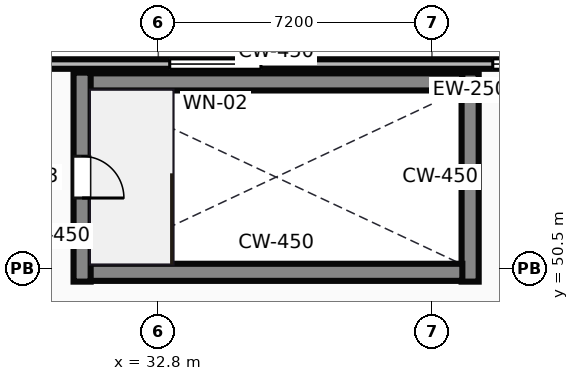
"""IFC4 building model, lengths in metres.
Left out: names, types, materials, properties, quantities, classifications, styles, units other than length and angle.
Written with IfcOpenShell. Run it as: python <this file> out.ifc"""

import sys

from ifc_helpers import new_model, si_unit, direction, frame, frame_2d, origin, place, context, subcontext, project, spatial, rectangle, extrude, source, transform, mapped, element, fill, save


model = new_model("IFC4")
c1 = context("Model", 3, precision=1e-05, world=origin(), true_north=direction((0.0, 1.0)))
c2 = subcontext(c1, "Body", "Model", "MODEL_VIEW")
j1 = project(units=[si_unit("LENGTHUNIT", "METRE"), si_unit("PLANEANGLEUNIT", "RADIAN")], contexts=[c1])
p1 = place(None, origin())
s1 = spatial("IfcSite", under=j1, at=p1, CompositionType="ELEMENT")
p2 = place(p1, origin())
s2 = spatial("IfcBuilding", under=s1, at=p2, CompositionType="ELEMENT")
p3 = place(p2, frame((0.0, 0.0, 21.0)))
s3 = spatial("IfcBuildingStorey", under=s2, at=p3, CompositionType="ELEMENT", Elevation=21.0)
m1 = source(origin(), c2, "Body", "SweptSolid", [
    extrude(rectangle(XDim=82.0, YDim=0.25, at=frame_2d((41.0, 0.0))), origin(), (0.0, 0.0, 1.0), 4.7),
])
p4 = place(p3, frame((82.0, 55.875, 0.0), z_axis=(0.0, 0.0, 1.0), x_axis=(-1.0, 0.0, 0.0)))
e1 = element("IfcWall", 1, at=p4, inside=s3, PredefinedType="STANDARD", context=c2, shape_type="MappedRepresentation", body=[
    mapped(m1, transform((0.0, 0.0, 0.0))),
])
p5 = place(p4, frame((8.0, 0.0, 0.9)))
e2 = element("IfcOpeningElement", 2, at=p5, cuts=e1, PredefinedType="OPENING", context=c2, shape_type="SweptSolid", body=[
    extrude(rectangle(XDim=2.4, YDim=2.2, at=frame_2d((1.2, 1.1))), frame((0.0, 0.135, 0.0), z_axis=(0.0, -1.0, 0.0), x_axis=(1.0, 0.0, 0.0)), (0.0, 0.0, 1.0), 0.27),
])
p6 = place(p4, frame((18.0, 0.0, 0.9)))
e3 = element("IfcOpeningElement", 3, at=p6, cuts=e1, PredefinedType="OPENING", context=c2, shape_type="SweptSolid", body=[
    extrude(rectangle(XDim=2.4, YDim=2.2, at=frame_2d((1.2, 1.1))), frame((0.0, 0.135, 0.0), z_axis=(0.0, -1.0, 0.0), x_axis=(1.0, 0.0, 0.0)), (0.0, 0.0, 1.0), 0.27),
])
p7 = place(p4, frame((28.0, 0.0, 0.9)))
e4 = element("IfcOpeningElement", 4, at=p7, cuts=e1, PredefinedType="OPENING", context=c2, shape_type="SweptSolid", body=[
    extrude(rectangle(XDim=2.4, YDim=2.2, at=frame_2d((1.2, 1.1))), frame((0.0, 0.135, 0.0), z_axis=(0.0, -1.0, 0.0), x_axis=(1.0, 0.0, 0.0)), (0.0, 0.0, 1.0), 0.27),
])
p8 = place(p4, frame((38.0, 0.0, 0.9)))
e5 = element("IfcOpeningElement", 5, at=p8, cuts=e1, PredefinedType="OPENING", context=c2, shape_type="SweptSolid", body=[
    extrude(rectangle(XDim=2.4, YDim=2.2, at=frame_2d((1.2, 1.1))), frame((0.0, 0.135, 0.0), z_axis=(0.0, -1.0, 0.0), x_axis=(1.0, 0.0, 0.0)), (0.0, 0.0, 1.0), 0.27),
])
p9 = place(p4, frame((46.5, 0.0, 0.9)))
e6 = element("IfcOpeningElement", 6, at=p9, cuts=e1, PredefinedType="OPENING", context=c2, shape_type="SweptSolid", body=[
    extrude(rectangle(XDim=2.4, YDim=2.2, at=frame_2d((1.2, 1.1))), frame((0.0, 0.135, 0.0), z_axis=(0.0, -1.0, 0.0), x_axis=(1.0, 0.0, 0.0)), (0.0, 0.0, 1.0), 0.27),
])
p10 = place(p4, frame((58.0, 0.0, 0.9)))
e7 = element("IfcOpeningElement", 7, at=p10, cuts=e1, PredefinedType="OPENING", context=c2, shape_type="SweptSolid", body=[
    extrude(rectangle(XDim=2.4, YDim=2.2, at=frame_2d((1.2, 1.1))), frame((0.0, 0.135, 0.0), z_axis=(0.0, -1.0, 0.0), x_axis=(1.0, 0.0, 0.0)), (0.0, 0.0, 1.0), 0.27),
])
p11 = place(p4, frame((66.0, 0.0, 0.9)))
e8 = element("IfcOpeningElement", 8, at=p11, cuts=e1, PredefinedType="OPENING", context=c2, shape_type="SweptSolid", body=[
    extrude(rectangle(XDim=2.4, YDim=2.2, at=frame_2d((1.2, 1.1))), frame((0.0, 0.135, 0.0), z_axis=(0.0, -1.0, 0.0), x_axis=(1.0, 0.0, 0.0)), (0.0, 0.0, 1.0), 0.27),
])
m2 = source(origin(), c2, "Body", "SweptSolid", [
    extrude(rectangle(XDim=5.5, YDim=0.45, at=frame_2d((2.75, 0.0))), origin(), (0.0, 0.0, 1.0), 4.7),
])
p12 = place(p3, frame((30.795, 50.15, 0.0), z_axis=(0.0, 0.0, 1.0), x_axis=(0.0, 1.0, 0.0)))
e9 = element("IfcWall", 9, at=p12, inside=s3, PredefinedType="SHEAR", context=c2, shape_type="MappedRepresentation", body=[
    mapped(m2, transform((0.0, 0.0, 0.0))),
])
p13 = place(p12, frame((2.2, 0.0, 0.0)))
e10 = element("IfcOpeningElement", 10, at=p13, cuts=e9, PredefinedType="OPENING", context=c2, shape_type="SweptSolid", body=[
    extrude(rectangle(XDim=1.1, YDim=2.15, at=frame_2d((0.55, 1.075))), frame((0.0, 0.235, 0.0), z_axis=(0.0, -1.0, 0.0), x_axis=(1.0, 0.0, 0.0)), (0.0, 0.0, 1.0), 0.47),
])
m3 = source(origin(), c2, "Body", "SweptSolid", [
    extrude(rectangle(XDim=9.8, YDim=0.45, at=frame_2d((4.9, 0.0))), origin(), (0.0, 0.0, 1.0), 4.7),
])
for number, where, z_axis, x_axis in (
    (11, (31.0, 50.395, 0.0), (0.0, 0.0, 1.0), (1.0, 0.0, 0.0)),
    (12, (31.0, 55.405, 0.0), (0.0, 0.0, 1.0), (1.0, 0.0, 0.0)),
):
    element("IfcWall", number, at=place(p3, frame(where, z_axis=z_axis, x_axis=x_axis)), inside=s3, PredefinedType="SHEAR", context=c2, shape_type="MappedRepresentation", body=[
        mapped(m3, transform((0.0, 0.0, 0.0))),
    ])
p14 = place(p3, frame((41.005, 50.15, 0.0), z_axis=(0.0, 0.0, 1.0), x_axis=(0.0, 1.0, 0.0)))
e13 = element("IfcWall", 13, at=p14, inside=s3, PredefinedType="SHEAR", context=c2, shape_type="MappedRepresentation", body=[
    mapped(m2, transform((0.0, 0.0, 0.0))),
])
m4 = source(origin(), c2, "Body", "SweptSolid", [
    extrude(rectangle(XDim=2.4, YDim=2.2, at=frame_2d((1.2, 1.1))), frame((0.0, 0.03, 0.0), z_axis=(0.0, -1.0, 0.0), x_axis=(1.0, 0.0, 0.0)), (0.0, 0.0, 1.0), 0.06),
])
p15 = place(p8, origin())
e14 = element("IfcWindow", 14, at=p15, inside=s3, PartitioningType="SINGLE_PANEL", PredefinedType="WINDOW", context=c2, shape_type="MappedRepresentation", body=[
    mapped(m4, transform((0.0, 0.0, 0.0))),
])
fill(e5, e14)
p16 = place(p9, origin())
e15 = element("IfcWindow", 15, at=p16, inside=s3, PartitioningType="SINGLE_PANEL", PredefinedType="WINDOW", context=c2, shape_type="MappedRepresentation", body=[
    mapped(m4, transform((0.0, 0.0, 0.0))),
])
fill(e6, e15)
m5 = source(origin(), c2, "Body", "SweptSolid", [
    extrude(rectangle(XDim=1.1, YDim=2.15, at=frame_2d((0.55, 1.075))), frame((0.0, 0.025, 0.0), z_axis=(0.0, -1.0, 0.0), x_axis=(1.0, 0.0, 0.0)), (0.0, 0.0, 1.0), 0.05),
])
p17 = place(p13, frame((1.1, 0.0, 0.0), z_axis=(0.0, 0.0, 1.0), x_axis=(-1.0, 0.0, 0.0)))
e16 = element("IfcDoor", 16, at=p17, inside=s3, OperationType="SINGLE_SWING_LEFT", PredefinedType="DOOR", context=c2, shape_type="MappedRepresentation", body=[
    mapped(m5, transform((0.0, 0.0, 0.0))),
])
fill(e10, e16)
save(model, sys.argv[1])
